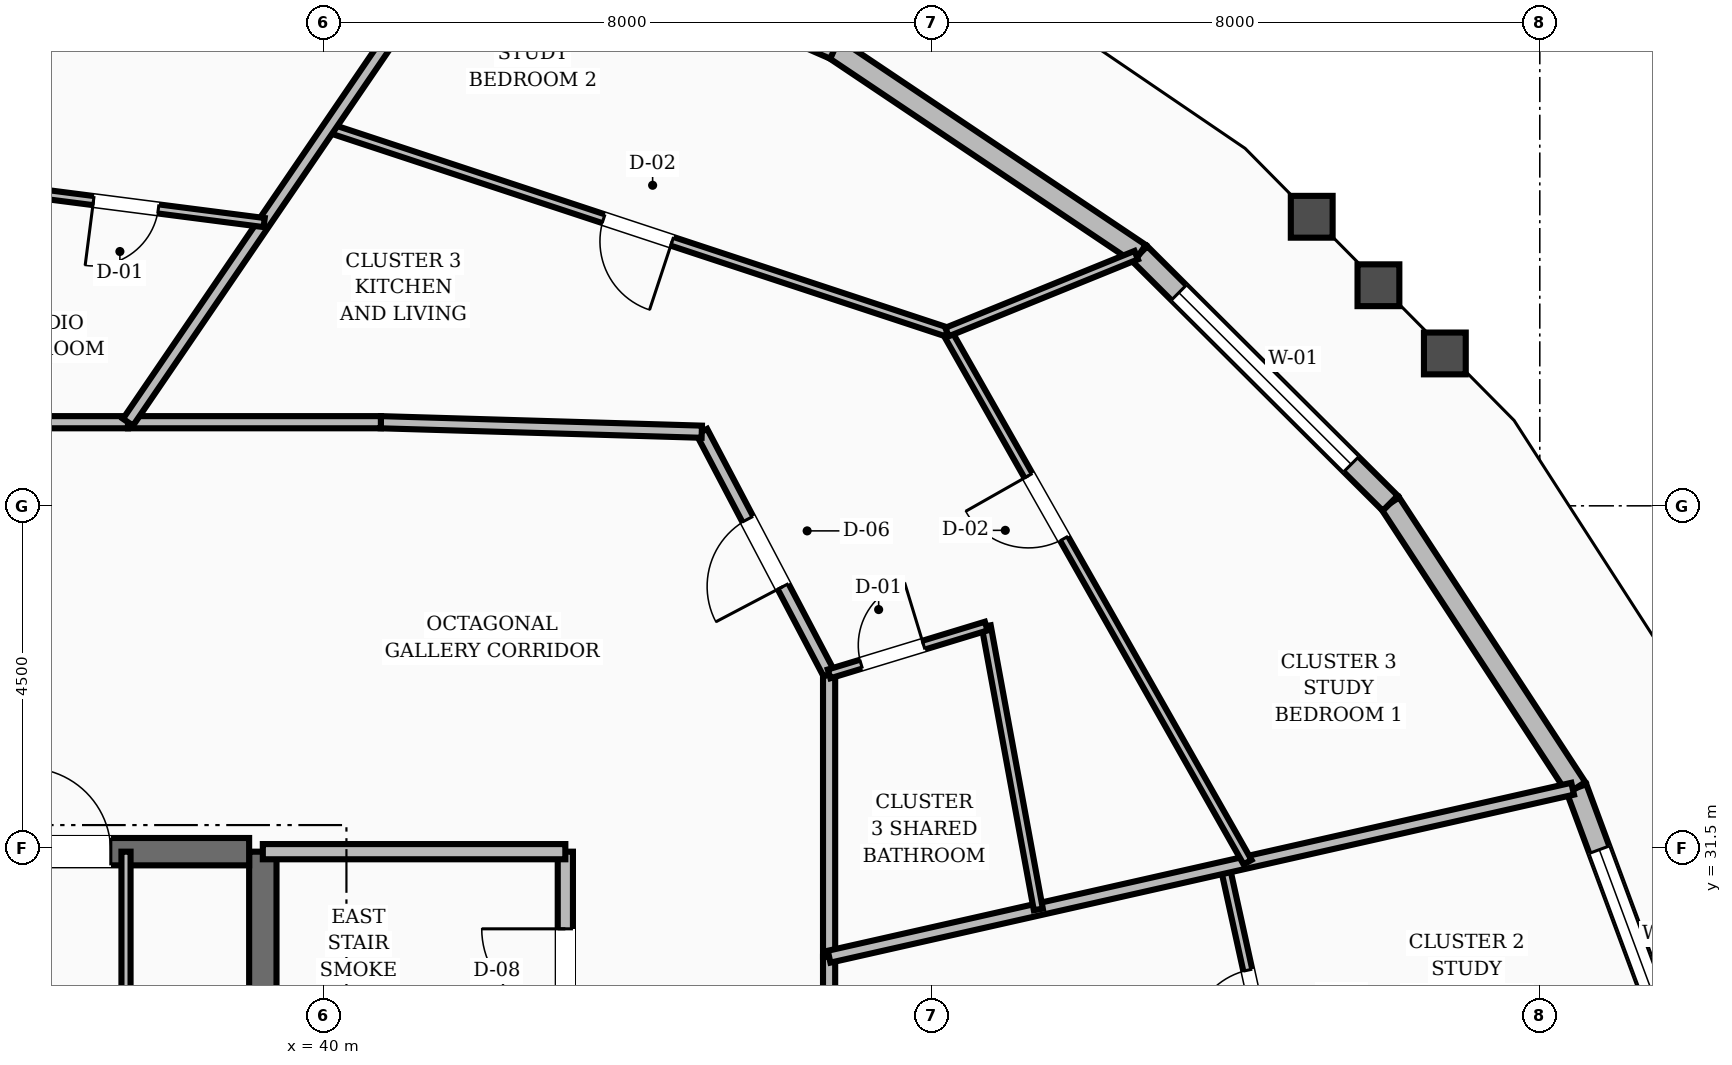
"""IFC4 building model, lengths in metres.
Left out: names, types, materials, properties, quantities, classifications, styles, units other than length and angle.
Written with IfcOpenShell. Run it as: python <this file> out.ifc"""

import sys

from ifc_helpers import new_model, si_unit, direction, frame, frame_2d, origin, place, context, subcontext, project, spatial, rectangle, extrude, element, fill, save


model = new_model("IFC4")
c1 = context("Model", 3, precision=1e-05, world=origin(), true_north=direction((0.0, 1.0)))
c2 = subcontext(c1, "Body", "Model", "MODEL_VIEW")
j1 = project(units=[si_unit("LENGTHUNIT", "METRE"), si_unit("PLANEANGLEUNIT", "RADIAN")], contexts=[c1])
p1 = place(None, origin())
s1 = spatial("IfcSite", under=j1, at=p1, CompositionType="ELEMENT")
p2 = place(p1, origin())
s2 = spatial("IfcBuilding", under=s1, at=p2, CompositionType="ELEMENT")
p3 = place(p2, frame((0.0, 0.0, 138.8)))
s3 = spatial("IfcBuildingStorey", under=s2, at=p3, CompositionType="ELEMENT", Elevation=138.8)
p4 = place(p3, frame((39.2, 25.15, 0.0), z_axis=(0.0, 0.0, 1.0), x_axis=(0.0, 1.0, 0.0)))
e1 = element("IfcWall", 1, at=p4, inside=s3, PredefinedType="SHEAR", context=c2, shape_type="SweptSolid", body=[
    extrude(rectangle(XDim=6.3, YDim=0.36, at=frame_2d((3.15, 0.0))), origin(), (0.0, 0.0, 1.0), 3.6),
])
p5 = place(p3, frame((35.8, 31.45, 0.0), z_axis=(0.0, 0.0, 1.0), x_axis=(1.0, 0.0, 0.0)))
e2 = element("IfcWall", 2, at=p5, inside=s3, PredefinedType="SHEAR", context=c2, shape_type="SweptSolid", body=[
    extrude(rectangle(XDim=3.22, YDim=0.36, at=frame_2d((1.61, 0.0))), origin(), (0.0, 0.0, 1.0), 3.6),
])
p6 = place(p5, frame((0.3, 0.0, 0.0)))
e3 = element("IfcOpeningElement", 3, at=p6, cuts=e2, PredefinedType="OPENING", context=c2, shape_type="SweptSolid", body=[
    extrude(rectangle(XDim=1.1, YDim=2.1, at=frame_2d((0.55, 1.05))), frame((0.0, 0.19, 0.0), z_axis=(0.0, -1.0, 0.0), x_axis=(1.0, 0.0, 0.0)), (0.0, 0.0, 1.0), 0.38),
])
p7 = place(p3, frame((57.989, 28.226, 0.0), z_axis=(0.0, 0.0, 1.0), x_axis=(-0.347886684165, 0.937536588609, 0.0)))
e4 = element("IfcWall", 4, at=p7, inside=s3, PredefinedType="STANDARD", context=c2, shape_type="SweptSolid", body=[
    extrude(rectangle(XDim=4.334, YDim=0.28, at=frame_2d((2.167, 0.0))), origin(), (0.0, 0.0, 1.0), 2.82),
])
p8 = place(p7, frame((0.867, 0.0, 0.8)))
e5 = element("IfcOpeningElement", 5, at=p8, cuts=e4, PredefinedType="OPENING", context=c2, shape_type="SweptSolid", body=[
    extrude(rectangle(XDim=2.6, YDim=1.65, at=frame_2d((1.3, 0.825))), frame((0.0, 0.15, 0.0), z_axis=(0.0, -1.0, 0.0), x_axis=(1.0, 0.0, 0.0)), (0.0, 0.0, 1.0), 0.3),
])
p9 = place(p3, frame((56.481, 32.289, 0.0), z_axis=(0.0, 0.0, 1.0), x_axis=(-0.54727435463, 0.836953272749, 0.0)))
e6 = element("IfcWall", 6, at=p9, inside=s3, PredefinedType="STANDARD", context=c2, shape_type="SweptSolid", body=[
    extrude(rectangle(XDim=4.474, YDim=0.28, at=frame_2d((2.237, 0.0))), origin(), (0.0, 0.0, 1.0), 2.82),
])
p10 = place(p3, frame((54.032, 36.034, 0.0), z_axis=(0.0, 0.0, 1.0), x_axis=(-0.708522616078, 0.705688105686, 0.0)))
e7 = element("IfcWall", 7, at=p10, inside=s3, PredefinedType="STANDARD", context=c2, shape_type="SweptSolid", body=[
    extrude(rectangle(XDim=4.651, YDim=0.28, at=frame_2d((2.326, 0.0))), origin(), (0.0, 0.0, 1.0), 2.82),
])
p11 = place(p10, frame((0.726, 0.0, 0.8)))
e8 = element("IfcOpeningElement", 8, at=p11, cuts=e7, PredefinedType="OPENING", context=c2, shape_type="SweptSolid", body=[
    extrude(rectangle(XDim=3.2, YDim=1.65, at=frame_2d((1.6, 0.825))), frame((0.0, 0.15, 0.0), z_axis=(0.0, -1.0, 0.0), x_axis=(1.0, 0.0, 0.0)), (0.0, 0.0, 1.0), 0.3),
])
p12 = place(p3, frame((50.737, 39.316, 0.0), z_axis=(0.0, 0.0, 1.0), x_axis=(-0.830431041812, 0.557121427334, 0.0)))
e9 = element("IfcWall", 9, at=p12, inside=s3, PredefinedType="STANDARD", context=c2, shape_type="SweptSolid", body=[
    extrude(rectangle(XDim=4.835, YDim=0.28, at=frame_2d((2.417, 0.0))), origin(), (0.0, 0.0, 1.0), 2.82),
])
p13 = place(p3, frame((46.722, 42.01, 0.0), z_axis=(0.0, 0.0, 1.0), x_axis=(-0.916348879192, 0.400380733307, 0.0)))
e10 = element("IfcWall", 10, at=p13, inside=s3, PredefinedType="STANDARD", context=c2, shape_type="SweptSolid", body=[
    extrude(rectangle(XDim=5.0, YDim=0.28, at=frame_2d((2.5, 0.0))), origin(), (0.0, 0.0, 1.0), 2.82),
])
p14 = place(p13, frame((0.9, 0.0, 0.8)))
e11 = element("IfcOpeningElement", 11, at=p14, cuts=e10, PredefinedType="OPENING", context=c2, shape_type="SweptSolid", body=[
    extrude(rectangle(XDim=3.2, YDim=1.65, at=frame_2d((1.6, 0.825))), frame((0.0, 0.15, 0.0), z_axis=(0.0, -1.0, 0.0), x_axis=(1.0, 0.0, 0.0)), (0.0, 0.0, 1.0), 0.3),
])
p15 = place(p3, frame((43.18, 28.32, 0.0), z_axis=(0.0, 0.0, 1.0), x_axis=(0.0, 1.0, 0.0)))
e12 = element("IfcWall", 12, at=p15, inside=s3, PredefinedType="SOLIDWALL", context=c2, shape_type="SweptSolid", body=[
    extrude(rectangle(XDim=3.13, YDim=0.2, at=frame_2d((1.565, 0.0))), origin(), (0.0, 0.0, 1.0), 2.8),
])
p16 = place(p15, frame((1.015, 0.0, 0.0)))
e13 = element("IfcOpeningElement", 13, at=p16, cuts=e12, PredefinedType="OPENING", context=c2, shape_type="SweptSolid", body=[
    extrude(rectangle(XDim=1.1, YDim=2.1, at=frame_2d((0.55, 1.05))), frame((0.0, 0.11, 0.0), z_axis=(0.0, -1.0, 0.0), x_axis=(1.0, 0.0, 0.0)), (0.0, 0.0, 1.0), 0.22),
])
p17 = place(p3, frame((39.2, 31.45, 0.0), z_axis=(0.0, 0.0, 1.0), x_axis=(1.0, 0.0, 0.0)))
e14 = element("IfcWall", 14, at=p17, inside=s3, PredefinedType="SOLIDWALL", context=c2, shape_type="SweptSolid", body=[
    extrude(rectangle(XDim=3.98, YDim=0.2, at=frame_2d((1.99, 0.0))), origin(), (0.0, 0.0, 1.0), 2.8),
])
p18 = place(p3, frame((37.4, 25.25, 0.0), z_axis=(0.0, 0.0, 1.0), x_axis=(0.0, 1.0, 0.0)))
e15 = element("IfcWall", 15, at=p18, inside=s3, PredefinedType="PARTITIONING", context=c2, shape_type="SweptSolid", body=[
    extrude(rectangle(XDim=6.2, YDim=0.12, at=frame_2d((3.1, 0.0))), origin(), (0.0, 0.0, 1.0), 2.8),
])
p19 = place(p18, frame((2.625, 0.0, 0.0)))
e16 = element("IfcOpeningElement", 16, at=p19, cuts=e15, PredefinedType="OPENING", context=c2, shape_type="SweptSolid", body=[
    extrude(rectangle(XDim=0.95, YDim=2.1, at=frame_2d((0.475, 1.05))), frame((0.0, 0.07, 0.0), z_axis=(0.0, -1.0, 0.0), x_axis=(1.0, 0.0, 0.0)), (0.0, 0.0, 1.0), 0.14),
])
p20 = place(p3, frame((46.65, 26.914, 0.0), z_axis=(0.0, 0.0, 1.0), x_axis=(0.0, 1.0, 0.0)))
e17 = element("IfcWall", 17, at=p20, inside=s3, PredefinedType="SOLIDWALL", context=c2, shape_type="SweptSolid", body=[
    extrude(rectangle(XDim=3.154, YDim=0.16, at=frame_2d((1.577, 0.0))), origin(), (0.0, 0.0, 1.0), 2.8),
])
p21 = place(p3, frame((46.65, 30.068, 0.0), z_axis=(0.0, 0.0, 1.0), x_axis=(0.0, 1.0, 0.0)))
e18 = element("IfcWall", 18, at=p21, inside=s3, PredefinedType="SOLIDWALL", context=c2, shape_type="SweptSolid", body=[
    extrude(rectangle(XDim=3.721, YDim=0.16, at=frame_2d((1.86, 0.0))), origin(), (0.0, 0.0, 1.0), 2.8),
])
p22 = place(p3, frame((46.65, 33.789, 0.0), z_axis=(0.0, 0.0, 1.0), x_axis=(-0.46527115782, 0.885168204185, 0.0)))
e19 = element("IfcWall", 19, at=p22, inside=s3, PredefinedType="SOLIDWALL", context=c2, shape_type="SweptSolid", body=[
    extrude(rectangle(XDim=3.6, YDim=0.16, at=frame_2d((1.8, 0.0))), origin(), (0.0, 0.0, 1.0), 2.8),
])
p23 = place(p22, frame((1.3, 0.0, 0.0)))
e20 = element("IfcOpeningElement", 20, at=p23, cuts=e19, PredefinedType="OPENING", context=c2, shape_type="SweptSolid", body=[
    extrude(rectangle(XDim=1.0, YDim=2.1, at=frame_2d((0.5, 1.05))), frame((0.0, 0.09, 0.0), z_axis=(0.0, -1.0, 0.0), x_axis=(1.0, 0.0, 0.0)), (0.0, 0.0, 1.0), 0.18),
])
p24 = place(p3, frame((44.975, 36.975, 0.0), z_axis=(0.0, 0.0, 1.0), x_axis=(-0.999561990195, 0.029594387265, 0.0)))
e21 = element("IfcWall", 21, at=p24, inside=s3, PredefinedType="SOLIDWALL", context=c2, shape_type="SweptSolid", body=[
    extrude(rectangle(XDim=4.224, YDim=0.16, at=frame_2d((2.112, 0.0))), origin(), (0.0, 0.0, 1.0), 2.8),
])
p25 = place(p3, frame((40.753, 37.1, 0.0), z_axis=(0.0, 0.0, 1.0), x_axis=(-1.0, 0.0, 0.0)))
e22 = element("IfcWall", 22, at=p25, inside=s3, PredefinedType="SOLIDWALL", context=c2, shape_type="SweptSolid", body=[
    extrude(rectangle(XDim=3.327, YDim=0.16, at=frame_2d((1.664, 0.0))), origin(), (0.0, 0.0, 1.0), 2.8),
])
p26 = place(p3, frame((37.426, 37.1, 0.0), z_axis=(0.0, 0.0, 1.0), x_axis=(-1.0, 0.0, 0.0)))
e23 = element("IfcWall", 23, at=p26, inside=s3, PredefinedType="SOLIDWALL", context=c2, shape_type="SweptSolid", body=[
    extrude(rectangle(XDim=2.821, YDim=0.16, at=frame_2d((1.41, 0.0))), origin(), (0.0, 0.0, 1.0), 2.8),
])
p27 = place(p3, frame((52.66, 27.609, 0.0), z_axis=(0.0, 0.0, 1.0), x_axis=(-0.214645343864, 0.976692058101, 0.0)))
e24 = element("IfcWall", 24, at=p27, inside=s3, PredefinedType="PARTITIONING", context=c2, shape_type="SweptSolid", body=[
    extrude(rectangle(XDim=3.723, YDim=0.12, at=frame_2d((1.861, 0.0))), origin(), (0.0, 0.0, 1.0), 2.8),
])
p28 = place(p27, frame((1.386, 0.0, 0.0)))
e25 = element("IfcOpeningElement", 25, at=p28, cuts=e24, PredefinedType="OPENING", context=c2, shape_type="SweptSolid", body=[
    extrude(rectangle(XDim=0.95, YDim=2.1, at=frame_2d((0.475, 1.05))), frame((0.0, 0.07, 0.0), z_axis=(0.0, -1.0, 0.0), x_axis=(1.0, 0.0, 0.0)), (0.0, 0.0, 1.0), 0.14),
])
p29 = place(p3, frame((46.65, 30.068, 0.0), z_axis=(0.0, 0.0, 1.0), x_axis=(0.975414000127, 0.220380417359, 0.0)))
e26 = element("IfcWall", 26, at=p29, inside=s3, PredefinedType="SOLIDWALL", context=c2, shape_type="SweptSolid", body=[
    extrude(rectangle(XDim=10.029, YDim=0.16, at=frame_2d((5.015, 0.0))), origin(), (0.0, 0.0, 1.0), 2.8),
])
p30 = place(p3, frame((49.403, 30.69, 0.0), z_axis=(0.0, 0.0, 1.0), x_axis=(-0.180891883728, 0.98350298749, 0.0)))
e27 = element("IfcWall", 27, at=p30, inside=s3, PredefinedType="PARTITIONING", context=c2, shape_type="SweptSolid", body=[
    extrude(rectangle(XDim=3.79, YDim=0.12, at=frame_2d((1.895, 0.0))), origin(), (0.0, 0.0, 1.0), 2.8),
])
p31 = place(p3, frame((46.65, 33.789, 0.0), z_axis=(0.0, 0.0, 1.0), x_axis=(0.956734072181, 0.290963769442, 0.0)))
e28 = element("IfcWall", 28, at=p31, inside=s3, PredefinedType="PARTITIONING", context=c2, shape_type="SweptSolid", body=[
    extrude(rectangle(XDim=2.161, YDim=0.12, at=frame_2d((1.08, 0.0))), origin(), (0.0, 0.0, 1.0), 2.8),
])
p32 = place(p31, frame((0.44, 0.0, 0.0)))
e29 = element("IfcOpeningElement", 29, at=p32, cuts=e28, PredefinedType="OPENING", context=c2, shape_type="SweptSolid", body=[
    extrude(rectangle(XDim=0.86, YDim=2.1, at=frame_2d((0.43, 1.05))), frame((0.0, 0.07, 0.0), z_axis=(0.0, -1.0, 0.0), x_axis=(1.0, 0.0, 0.0)), (0.0, 0.0, 1.0), 0.14),
])
p33 = place(p3, frame((52.156, 31.312, 0.0), z_axis=(0.0, 0.0, 1.0), x_axis=(-0.493164704103, 0.869935960072, 0.0)))
e30 = element("IfcWall", 30, at=p33, inside=s3, PredefinedType="PARTITIONING", context=c2, shape_type="SweptSolid", body=[
    extrude(rectangle(XDim=8.017, YDim=0.12, at=frame_2d((4.008, 0.0))), origin(), (0.0, 0.0, 1.0), 2.8),
])
p34 = place(p33, frame((4.895, 0.0, 0.0)))
e31 = element("IfcOpeningElement", 31, at=p34, cuts=e30, PredefinedType="OPENING", context=c2, shape_type="SweptSolid", body=[
    extrude(rectangle(XDim=0.95, YDim=2.1, at=frame_2d((0.475, 1.05))), frame((0.0, 0.07, 0.0), z_axis=(0.0, -1.0, 0.0), x_axis=(1.0, 0.0, 0.0)), (0.0, 0.0, 1.0), 0.14),
])
p35 = place(p3, frame((48.202, 38.286, 0.0), z_axis=(0.0, 0.0, 1.0), x_axis=(-0.949636450875, 0.313353811482, 0.0)))
e32 = element("IfcWall", 32, at=p35, inside=s3, PredefinedType="PARTITIONING", context=c2, shape_type="SweptSolid", body=[
    extrude(rectangle(XDim=8.567, YDim=0.12, at=frame_2d((4.284, 0.0))), origin(), (0.0, 0.0, 1.0), 2.8),
])
p36 = place(p35, frame((3.809, 0.0, 0.0)))
e33 = element("IfcOpeningElement", 33, at=p36, cuts=e32, PredefinedType="OPENING", context=c2, shape_type="SweptSolid", body=[
    extrude(rectangle(XDim=0.95, YDim=2.1, at=frame_2d((0.475, 1.05))), frame((0.0, 0.07, 0.0), z_axis=(0.0, -1.0, 0.0), x_axis=(1.0, 0.0, 0.0)), (0.0, 0.0, 1.0), 0.14),
])
p37 = place(p3, frame((48.202, 38.286, 0.0), z_axis=(0.0, 0.0, 1.0), x_axis=(0.926425973207, 0.376476979598, 0.0)))
e34 = element("IfcWall", 34, at=p37, inside=s3, PredefinedType="PARTITIONING", context=c2, shape_type="SweptSolid", body=[
    extrude(rectangle(XDim=2.687, YDim=0.12, at=frame_2d((1.343, 0.0))), origin(), (0.0, 0.0, 1.0), 2.8),
])
p38 = place(p3, frame((37.426, 37.1, 0.0), z_axis=(0.0, 0.0, 1.0), x_axis=(0.563462523852, 0.826141624792, 0.0)))
e35 = element("IfcWall", 35, at=p38, inside=s3, PredefinedType="SOLIDWALL", context=c2, shape_type="SweptSolid", body=[
    extrude(rectangle(XDim=8.316, YDim=0.16, at=frame_2d((4.158, 0.0))), origin(), (0.0, 0.0, 1.0), 2.8),
])
p39 = place(p3, frame((39.218, 39.727, 0.0), z_axis=(0.0, 0.0, 1.0), x_axis=(-0.991815435092, 0.127679844587, 0.0)))
e36 = element("IfcWall", 36, at=p39, inside=s3, PredefinedType="PARTITIONING", context=c2, shape_type="SweptSolid", body=[
    extrude(rectangle(XDim=3.667, YDim=0.12, at=frame_2d((1.834, 0.0))), origin(), (0.0, 0.0, 1.0), 2.8),
])
p40 = place(p39, frame((1.404, 0.0, 0.0)))
e37 = element("IfcOpeningElement", 37, at=p40, cuts=e36, PredefinedType="OPENING", context=c2, shape_type="SweptSolid", body=[
    extrude(rectangle(XDim=0.86, YDim=2.1, at=frame_2d((0.43, 1.05))), frame((0.0, 0.07, 0.0), z_axis=(0.0, -1.0, 0.0), x_axis=(1.0, 0.0, 0.0)), (0.0, 0.0, 1.0), 0.14),
])
p41 = place(p8, origin())
e38 = element("IfcWindow", 38, at=p41, inside=s3, PartitioningType="SINGLE_PANEL", PredefinedType="WINDOW", context=c2, shape_type="SweptSolid", body=[
    extrude(rectangle(XDim=2.6, YDim=1.65, at=frame_2d((1.3, 0.825))), frame((0.0, 0.03, 0.0), z_axis=(0.0, -1.0, 0.0), x_axis=(1.0, 0.0, 0.0)), (0.0, 0.0, 1.0), 0.06),
])
fill(e5, e38)
p42 = place(p11, origin())
e39 = element("IfcWindow", 39, at=p42, inside=s3, PartitioningType="SINGLE_PANEL", PredefinedType="WINDOW", context=c2, shape_type="SweptSolid", body=[
    extrude(rectangle(XDim=3.2, YDim=1.65, at=frame_2d((1.6, 0.825))), frame((0.0, 0.03, 0.0), z_axis=(0.0, -1.0, 0.0), x_axis=(1.0, 0.0, 0.0)), (0.0, 0.0, 1.0), 0.06),
])
fill(e8, e39)
p43 = place(p16, origin())
e40 = element("IfcDoor", 40, at=p43, inside=s3, OperationType="SINGLE_SWING_RIGHT", PredefinedType="DOOR", context=c2, shape_type="SweptSolid", body=[
    extrude(rectangle(XDim=1.1, YDim=2.1, at=frame_2d((0.55, 1.05))), frame((0.0, 0.025, 0.0), z_axis=(0.0, -1.0, 0.0), x_axis=(1.0, 0.0, 0.0)), (0.0, 0.0, 1.0), 0.05),
])
fill(e13, e40)
p44 = place(p6, origin())
e41 = element("IfcDoor", 41, at=p44, inside=s3, OperationType="SINGLE_SWING_LEFT", PredefinedType="DOOR", context=c2, shape_type="SweptSolid", body=[
    extrude(rectangle(XDim=1.1, YDim=2.1, at=frame_2d((0.55, 1.05))), frame((0.0, 0.025, 0.0), z_axis=(0.0, -1.0, 0.0), x_axis=(1.0, 0.0, 0.0)), (0.0, 0.0, 1.0), 0.05),
])
fill(e3, e41)
p45 = place(p28, origin())
e42 = element("IfcDoor", 42, at=p45, inside=s3, OperationType="SINGLE_SWING_LEFT", PredefinedType="DOOR", context=c2, shape_type="SweptSolid", body=[
    extrude(rectangle(XDim=0.95, YDim=2.1, at=frame_2d((0.475, 1.05))), frame((0.0, 0.025, 0.0), z_axis=(0.0, -1.0, 0.0), x_axis=(1.0, 0.0, 0.0)), (0.0, 0.0, 1.0), 0.05),
])
fill(e25, e42)
p46 = place(p32, origin())
e43 = element("IfcDoor", 43, at=p46, inside=s3, OperationType="SINGLE_SWING_RIGHT", PredefinedType="DOOR", context=c2, shape_type="SweptSolid", body=[
    extrude(rectangle(XDim=0.86, YDim=2.1, at=frame_2d((0.43, 1.05))), frame((0.0, 0.025, 0.0), z_axis=(0.0, -1.0, 0.0), x_axis=(1.0, 0.0, 0.0)), (0.0, 0.0, 1.0), 0.05),
])
fill(e29, e43)
p47 = place(p23, origin())
e44 = element("IfcDoor", 44, at=p47, inside=s3, OperationType="SINGLE_SWING_LEFT", PredefinedType="DOOR", context=c2, shape_type="SweptSolid", body=[
    extrude(rectangle(XDim=1.0, YDim=2.1, at=frame_2d((0.5, 1.05))), frame((0.0, 0.025, 0.0), z_axis=(0.0, -1.0, 0.0), x_axis=(1.0, 0.0, 0.0)), (0.0, 0.0, 1.0), 0.05),
])
fill(e20, e44)
p48 = place(p34, origin())
e45 = element("IfcDoor", 45, at=p48, inside=s3, OperationType="SINGLE_SWING_RIGHT", PredefinedType="DOOR", context=c2, shape_type="SweptSolid", body=[
    extrude(rectangle(XDim=0.95, YDim=2.1, at=frame_2d((0.475, 1.05))), frame((0.0, 0.025, 0.0), z_axis=(0.0, -1.0, 0.0), x_axis=(1.0, 0.0, 0.0)), (0.0, 0.0, 1.0), 0.05),
])
fill(e31, e45)
p49 = place(p36, origin())
e46 = element("IfcDoor", 46, at=p49, inside=s3, OperationType="SINGLE_SWING_LEFT", PredefinedType="DOOR", context=c2, shape_type="SweptSolid", body=[
    extrude(rectangle(XDim=0.95, YDim=2.1, at=frame_2d((0.475, 1.05))), frame((0.0, 0.025, 0.0), z_axis=(0.0, -1.0, 0.0), x_axis=(1.0, 0.0, 0.0)), (0.0, 0.0, 1.0), 0.05),
])
fill(e33, e46)
p50 = place(p40, origin())
e47 = element("IfcDoor", 47, at=p50, inside=s3, OperationType="SINGLE_SWING_RIGHT", PredefinedType="DOOR", context=c2, shape_type="SweptSolid", body=[
    extrude(rectangle(XDim=0.86, YDim=2.1, at=frame_2d((0.43, 1.05))), frame((0.0, 0.025, 0.0), z_axis=(0.0, -1.0, 0.0), x_axis=(1.0, 0.0, 0.0)), (0.0, 0.0, 1.0), 0.05),
])
fill(e37, e47)
save(model, sys.argv[1])
